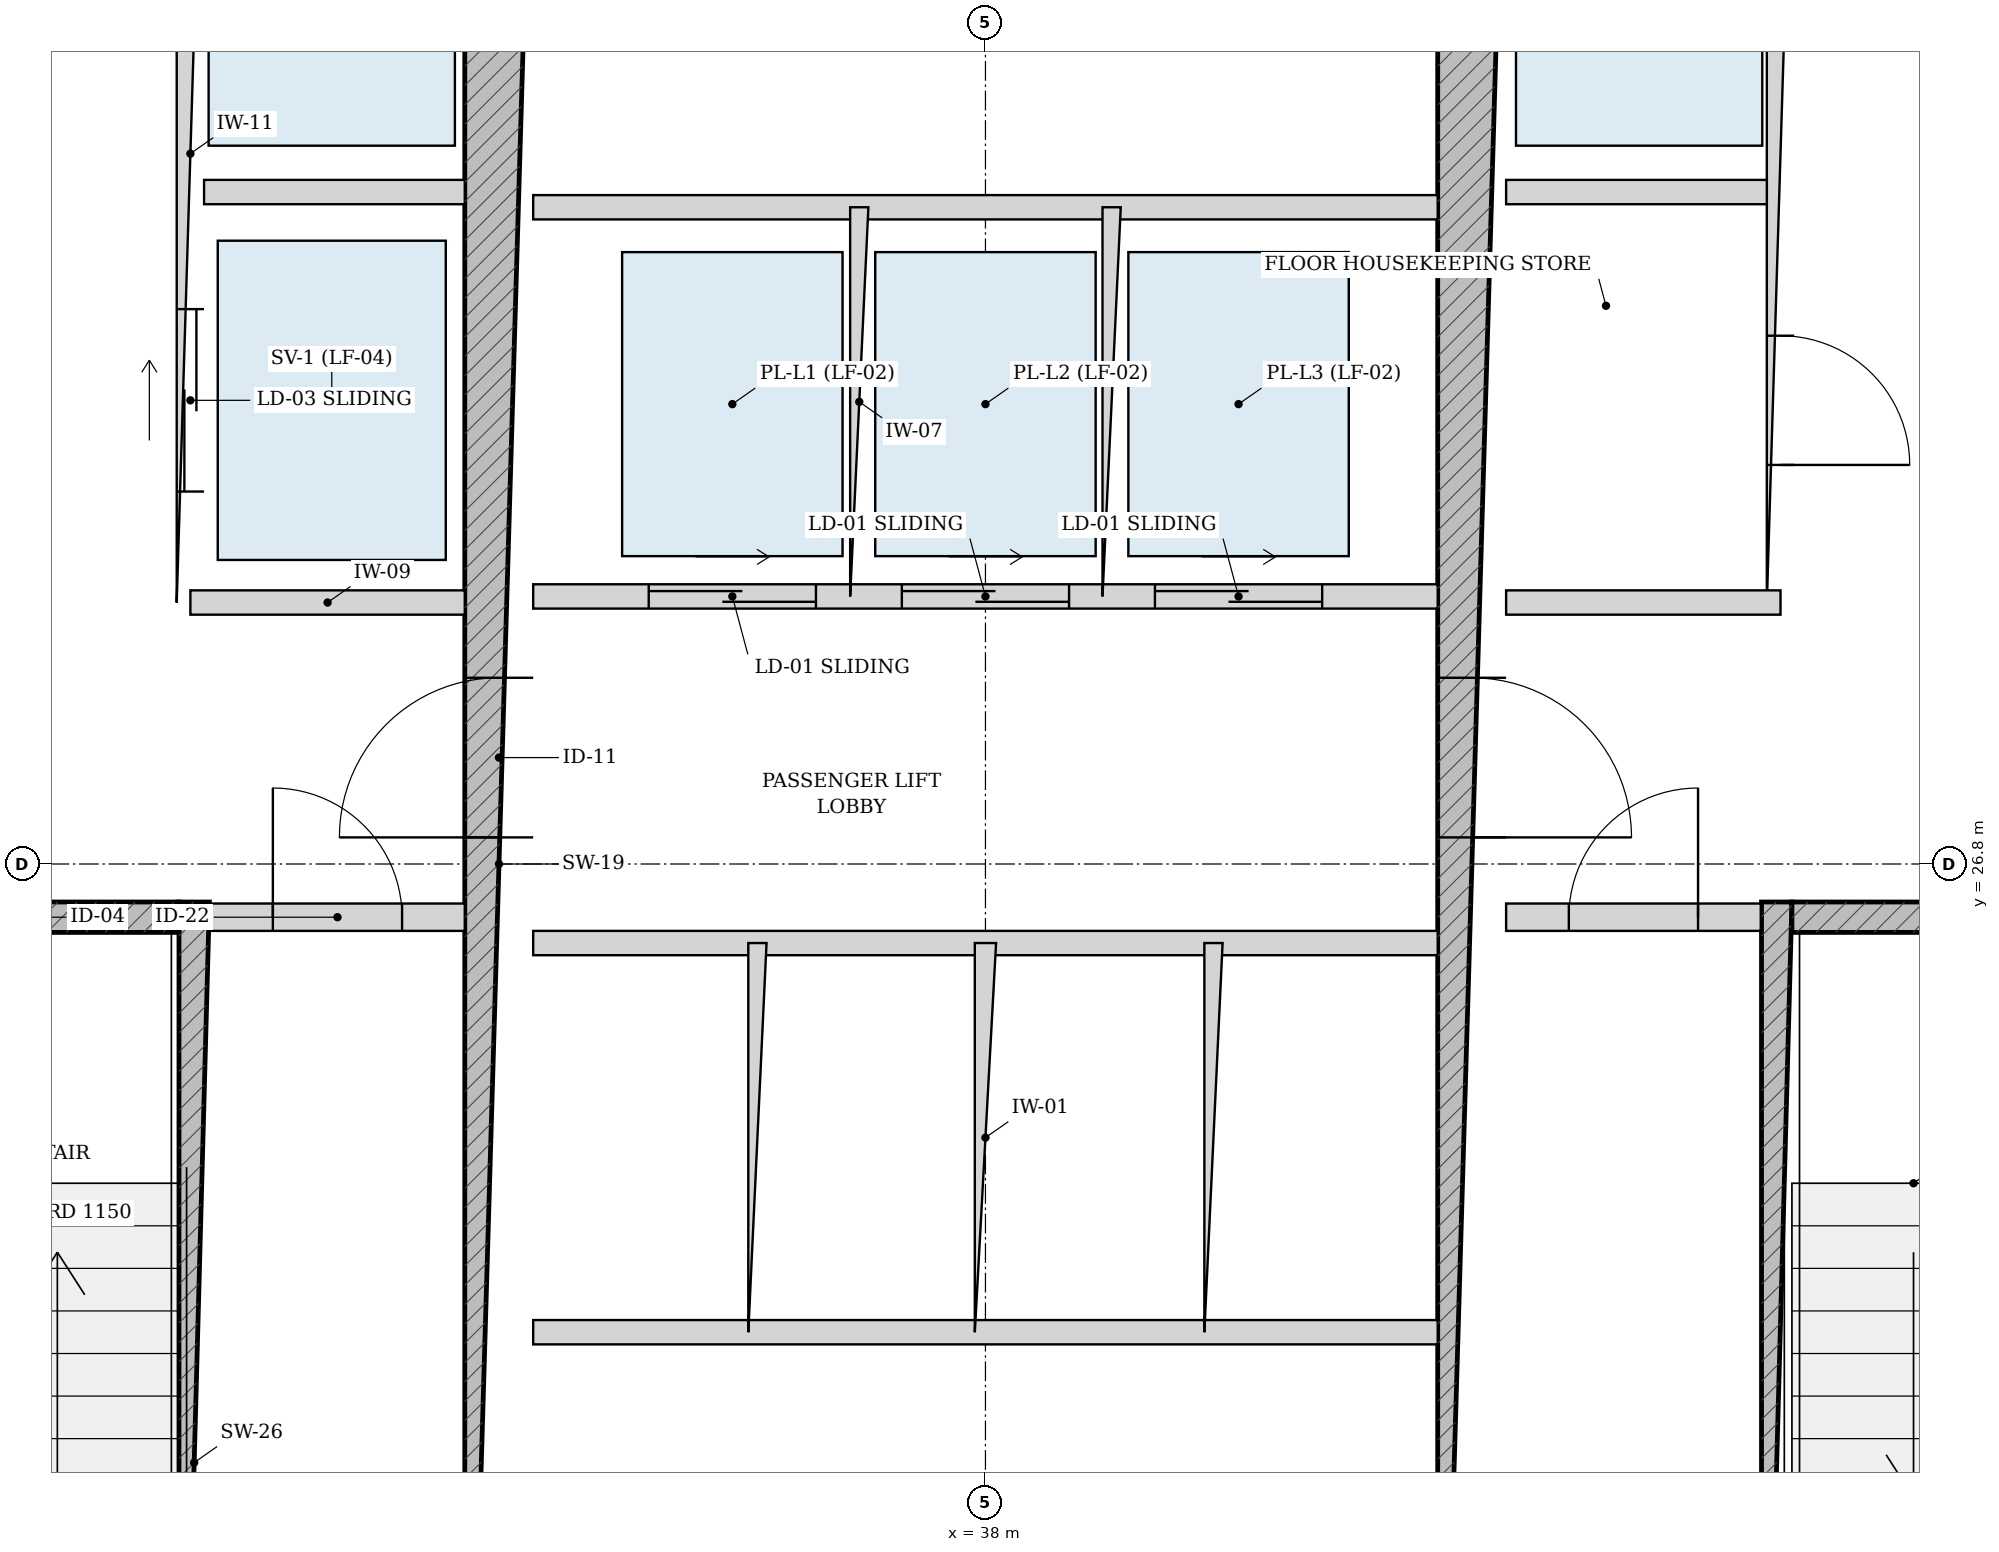
"""IFC4 building model, lengths in metres.
Left out: names, types, materials, properties, quantities, classifications, styles, units other than length and angle.
Written with IfcOpenShell. Run it as: python <this file> out.ifc"""

import sys

from ifc_helpers import new_model, si_unit, direction, frame, frame_2d, origin, place, context, subcontext, project, spatial, rectangle, extrude, source, transform, mapped, element, fill, save


model = new_model("IFC4")
c1 = context("Model", 3, precision=1e-05, world=origin(), true_north=direction((-0.2419218956, 0.970295726276)))
c2 = subcontext(c1, "Body", "Model", "MODEL_VIEW")
j1 = project(units=[si_unit("LENGTHUNIT", "METRE"), si_unit("PLANEANGLEUNIT", "RADIAN")], contexts=[c1])
p1 = place(None, origin())
s1 = spatial("IfcSite", under=j1, at=p1, CompositionType="ELEMENT")
p2 = place(p1, origin())
s2 = spatial("IfcBuilding", under=s1, at=p2, CompositionType="ELEMENT")
p3 = place(p2, frame((0.0, 0.0, 56.4)))
s3 = spatial("IfcBuildingStorey", under=s2, at=p3, CompositionType="ELEMENT", Elevation=56.4)
p4 = place(p3, frame((32.795, 19.175, 0.0), z_axis=(0.0, 0.0, 1.0), x_axis=(0.0, 1.0, 0.0)))
e1 = element("IfcWall", 1, at=p4, inside=s3, PredefinedType="SOLIDWALL", context=c2, shape_type="SweptSolid", body=[
    extrude(rectangle(XDim=7.375, YDim=0.2, at=frame_2d((3.688, 0.0))), origin(), (0.0, 0.0, 1.0), 3.32),
])
p5 = place(p3, frame((29.375, 26.45, 0.0), z_axis=(0.0, 0.0, 1.0), x_axis=(1.0, 0.0, 0.0)))
e2 = element("IfcWall", 2, at=p5, inside=s3, PredefinedType="SOLIDWALL", context=c2, shape_type="SweptSolid", body=[
    extrude(rectangle(XDim=3.32, YDim=0.2, at=frame_2d((1.66, 0.0))), origin(), (0.0, 0.0, 1.0), 3.32),
])
p6 = place(p5, frame((1.185, 0.0, 0.0)))
e3 = element("IfcOpeningElement", 3, at=p6, cuts=e2, PredefinedType="OPENING", context=c2, shape_type="SweptSolid", body=[
    extrude(rectangle(XDim=0.95, YDim=2.15, at=frame_2d((0.475, 1.075))), frame((0.0, 0.11, 0.0), z_axis=(0.0, -1.0, 0.0), x_axis=(1.0, 0.0, 0.0)), (0.0, 0.0, 1.0), 0.22),
])
p7 = place(p3, frame((43.205, 19.175, 0.0), z_axis=(0.0, 0.0, 1.0), x_axis=(0.0, 1.0, 0.0)))
e4 = element("IfcWall", 4, at=p7, inside=s3, PredefinedType="SOLIDWALL", context=c2, shape_type="SweptSolid", body=[
    extrude(rectangle(XDim=7.375, YDim=0.2, at=frame_2d((3.688, 0.0))), origin(), (0.0, 0.0, 1.0), 3.32),
])
p8 = place(p3, frame((43.305, 26.45, 0.0), z_axis=(0.0, 0.0, 1.0), x_axis=(1.0, 0.0, 0.0)))
e5 = element("IfcWall", 5, at=p8, inside=s3, PredefinedType="SOLIDWALL", context=c2, shape_type="SweptSolid", body=[
    extrude(rectangle(XDim=3.32, YDim=0.2, at=frame_2d((1.66, 0.0))), origin(), (0.0, 0.0, 1.0), 3.32),
])
p9 = place(p8, frame((1.185, 0.0, 0.0)))
e6 = element("IfcOpeningElement", 6, at=p9, cuts=e5, PredefinedType="OPENING", context=c2, shape_type="SweptSolid", body=[
    extrude(rectangle(XDim=0.95, YDim=2.15, at=frame_2d((0.475, 1.075))), frame((0.0, 0.11, 0.0), z_axis=(0.0, -1.0, 0.0), x_axis=(1.0, 0.0, 0.0)), (0.0, 0.0, 1.0), 0.22),
])
p10 = place(p3, frame((34.8, 19.175, 0.0), z_axis=(0.0, 0.0, 1.0), x_axis=(0.0, 1.0, 0.0)))
e7 = element("IfcWall", 7, at=p10, inside=s3, PredefinedType="SHEAR", context=c2, shape_type="SweptSolid", body=[
    extrude(rectangle(XDim=15.25, YDim=0.45, at=frame_2d((7.625, 0.0))), origin(), (0.0, 0.0, 1.0), 3.32),
])
p11 = place(p10, frame((7.8, 0.0, 0.0)))
e8 = element("IfcOpeningElement", 8, at=p11, cuts=e7, PredefinedType="OPENING", context=c2, shape_type="SweptSolid", body=[
    extrude(rectangle(XDim=1.05, YDim=2.15, at=frame_2d((0.525, 1.075))), frame((0.0, 0.235, 0.0), z_axis=(0.0, -1.0, 0.0), x_axis=(1.0, 0.0, 0.0)), (0.0, 0.0, 1.0), 0.47),
])
p12 = place(p3, frame((41.2, 19.175, 0.0), z_axis=(0.0, 0.0, 1.0), x_axis=(0.0, 1.0, 0.0)))
e9 = element("IfcWall", 9, at=p12, inside=s3, PredefinedType="SHEAR", context=c2, shape_type="SweptSolid", body=[
    extrude(rectangle(XDim=15.25, YDim=0.45, at=frame_2d((7.625, 0.0))), origin(), (0.0, 0.0, 1.0), 3.32),
])
p13 = place(p12, frame((7.8, 0.0, 0.0)))
e10 = element("IfcOpeningElement", 10, at=p13, cuts=e9, PredefinedType="OPENING", context=c2, shape_type="SweptSolid", body=[
    extrude(rectangle(XDim=1.05, YDim=2.15, at=frame_2d((0.525, 1.075))), frame((0.0, 0.235, 0.0), z_axis=(0.0, -1.0, 0.0), x_axis=(1.0, 0.0, 0.0)), (0.0, 0.0, 1.0), 0.47),
])
p14 = place(p3, frame((32.9, 26.45, 0.0), z_axis=(0.0, 0.0, 1.0), x_axis=(1.0, 0.0, 0.0)))
e11 = element("IfcWall", 11, at=p14, inside=s3, PredefinedType="PARTITIONING", context=c2, shape_type="SweptSolid", body=[
    extrude(rectangle(XDim=1.675, YDim=0.18, at=frame_2d((0.837, 0.0))), origin(), (0.0, 0.0, 1.0), 3.32),
])
p15 = place(p14, frame((0.413, 0.0, 0.0)))
e12 = element("IfcOpeningElement", 12, at=p15, cuts=e11, PredefinedType="OPENING", context=c2, shape_type="SweptSolid", body=[
    extrude(rectangle(XDim=0.85, YDim=2.1, at=frame_2d((0.425, 1.05))), frame((0.0, 0.1, 0.0), z_axis=(0.0, -1.0, 0.0), x_axis=(1.0, 0.0, 0.0)), (0.0, 0.0, 1.0), 0.2),
])
p16 = place(p3, frame((41.425, 26.45, 0.0), z_axis=(0.0, 0.0, 1.0), x_axis=(1.0, 0.0, 0.0)))
e13 = element("IfcWall", 13, at=p16, inside=s3, PredefinedType="PARTITIONING", context=c2, shape_type="SweptSolid", body=[
    extrude(rectangle(XDim=1.675, YDim=0.18, at=frame_2d((0.837, 0.0))), origin(), (0.0, 0.0, 1.0), 3.32),
])
p17 = place(p16, frame((0.413, 0.0, 0.0)))
e14 = element("IfcOpeningElement", 14, at=p17, cuts=e13, PredefinedType="OPENING", context=c2, shape_type="SweptSolid", body=[
    extrude(rectangle(XDim=0.85, YDim=2.1, at=frame_2d((0.425, 1.05))), frame((0.0, 0.1, 0.0), z_axis=(0.0, -1.0, 0.0), x_axis=(1.0, 0.0, 0.0)), (0.0, 0.0, 1.0), 0.2),
])
p18 = place(p3, frame((32.77, 28.52, 0.0), z_axis=(0.0, 0.0, 1.0), x_axis=(0.0, 1.0, 0.0)))
e15 = element("IfcWall", 15, at=p18, inside=s3, PredefinedType="PARTITIONING", context=c2, shape_type="SweptSolid", body=[
    extrude(rectangle(XDim=5.905, YDim=0.18, at=frame_2d((2.953, 0.0))), origin(), (0.0, 0.0, 1.0), 3.32),
])
p19 = place(p18, frame((3.655, 0.0, 0.0)))
e16 = element("IfcOpeningElement", 16, at=p19, cuts=e15, PredefinedType="OPENING", context=c2, shape_type="SweptSolid", body=[
    extrude(rectangle(XDim=1.15, YDim=2.2, at=frame_2d((0.575, 1.1))), frame((0.0, 0.1, 0.0), z_axis=(0.0, -1.0, 0.0), x_axis=(1.0, 0.0, 0.0)), (0.0, 0.0, 1.0), 0.2),
])
p20 = place(p18, frame((0.73, 0.0, 0.0)))
e17 = element("IfcOpeningElement", 17, at=p20, cuts=e15, PredefinedType="OPENING", context=c2, shape_type="SweptSolid", body=[
    extrude(rectangle(XDim=1.2, YDim=2.25, at=frame_2d((0.6, 1.125))), frame((0.0, 0.1, 0.0), z_axis=(0.0, -1.0, 0.0), x_axis=(1.0, 0.0, 0.0)), (0.0, 0.0, 1.0), 0.2),
])
p21 = place(p3, frame((32.86, 31.22, 0.0), z_axis=(0.0, 0.0, 1.0), x_axis=(1.0, 0.0, 0.0)))
e18 = element("IfcWall", 18, at=p21, inside=s3, PredefinedType="PARTITIONING", context=c2, shape_type="SweptSolid", body=[
    extrude(rectangle(XDim=1.715, YDim=0.16, at=frame_2d((0.857, 0.0))), origin(), (0.0, 0.0, 1.0), 3.32),
])
p22 = place(p3, frame((32.77, 28.52, 0.0), z_axis=(0.0, 0.0, 1.0), x_axis=(1.0, 0.0, 0.0)))
e19 = element("IfcWall", 19, at=p22, inside=s3, PredefinedType="PARTITIONING", context=c2, shape_type="SweptSolid", body=[
    extrude(rectangle(XDim=1.805, YDim=0.16, at=frame_2d((0.902, 0.0))), origin(), (0.0, 0.0, 1.0), 3.32),
])
p23 = place(p3, frame((43.23, 28.52, 0.0), z_axis=(0.0, 0.0, 1.0), x_axis=(0.0, 1.0, 0.0)))
e20 = element("IfcWall", 20, at=p23, inside=s3, PredefinedType="PARTITIONING", context=c2, shape_type="SweptSolid", body=[
    extrude(rectangle(XDim=5.905, YDim=0.18, at=frame_2d((2.953, 0.0))), origin(), (0.0, 0.0, 1.0), 3.32),
])
p24 = place(p23, frame((0.905, 0.0, 0.0)))
e21 = element("IfcOpeningElement", 21, at=p24, cuts=e20, PredefinedType="OPENING", context=c2, shape_type="SweptSolid", body=[
    extrude(rectangle(XDim=0.85, YDim=2.1, at=frame_2d((0.425, 1.05))), frame((0.0, 0.1, 0.0), z_axis=(0.0, -1.0, 0.0), x_axis=(1.0, 0.0, 0.0)), (0.0, 0.0, 1.0), 0.2),
])
p25 = place(p23, frame((3.655, 0.0, 0.0)))
e22 = element("IfcOpeningElement", 22, at=p25, cuts=e20, PredefinedType="OPENING", context=c2, shape_type="SweptSolid", body=[
    extrude(rectangle(XDim=1.15, YDim=2.2, at=frame_2d((0.575, 1.1))), frame((0.0, 0.1, 0.0), z_axis=(0.0, -1.0, 0.0), x_axis=(1.0, 0.0, 0.0)), (0.0, 0.0, 1.0), 0.2),
])
p26 = place(p3, frame((41.425, 31.22, 0.0), z_axis=(0.0, 0.0, 1.0), x_axis=(1.0, 0.0, 0.0)))
e23 = element("IfcWall", 23, at=p26, inside=s3, PredefinedType="PARTITIONING", context=c2, shape_type="SweptSolid", body=[
    extrude(rectangle(XDim=1.715, YDim=0.16, at=frame_2d((0.857, 0.0))), origin(), (0.0, 0.0, 1.0), 3.32),
])
p27 = place(p3, frame((41.425, 28.52, 0.0), z_axis=(0.0, 0.0, 1.0), x_axis=(1.0, 0.0, 0.0)))
e24 = element("IfcWall", 24, at=p27, inside=s3, PredefinedType="PARTITIONING", context=c2, shape_type="SweptSolid", body=[
    extrude(rectangle(XDim=1.805, YDim=0.16, at=frame_2d((0.902, 0.0))), origin(), (0.0, 0.0, 1.0), 3.32),
])
p28 = place(p3, frame((35.025, 28.56, 0.0), z_axis=(0.0, 0.0, 1.0), x_axis=(1.0, 0.0, 0.0)))
e25 = element("IfcWall", 25, at=p28, inside=s3, PredefinedType="PARTITIONING", context=c2, shape_type="SweptSolid", body=[
    extrude(rectangle(XDim=5.95, YDim=0.16, at=frame_2d((2.975, 0.0))), origin(), (0.0, 0.0, 1.0), 3.32),
])
p29 = place(p28, frame((0.76, 0.0, 0.0)))
e26 = element("IfcOpeningElement", 26, at=p29, cuts=e25, PredefinedType="OPENING", context=c2, shape_type="SweptSolid", body=[
    extrude(rectangle(XDim=1.1, YDim=2.2, at=frame_2d((0.55, 1.1))), frame((0.0, 0.09, 0.0), z_axis=(0.0, -1.0, 0.0), x_axis=(1.0, 0.0, 0.0)), (0.0, 0.0, 1.0), 0.18),
])
p30 = place(p28, frame((2.425, 0.0, 0.0)))
e27 = element("IfcOpeningElement", 27, at=p30, cuts=e25, PredefinedType="OPENING", context=c2, shape_type="SweptSolid", body=[
    extrude(rectangle(XDim=1.1, YDim=2.2, at=frame_2d((0.55, 1.1))), frame((0.0, 0.09, 0.0), z_axis=(0.0, -1.0, 0.0), x_axis=(1.0, 0.0, 0.0)), (0.0, 0.0, 1.0), 0.18),
])
p31 = place(p28, frame((4.09, 0.0, 0.0)))
e28 = element("IfcOpeningElement", 28, at=p31, cuts=e25, PredefinedType="OPENING", context=c2, shape_type="SweptSolid", body=[
    extrude(rectangle(XDim=1.1, YDim=2.2, at=frame_2d((0.55, 1.1))), frame((0.0, 0.09, 0.0), z_axis=(0.0, -1.0, 0.0), x_axis=(1.0, 0.0, 0.0)), (0.0, 0.0, 1.0), 0.18),
])
p32 = place(p3, frame((35.025, 31.12, 0.0), z_axis=(0.0, 0.0, 1.0), x_axis=(1.0, 0.0, 0.0)))
e29 = element("IfcWall", 29, at=p32, inside=s3, PredefinedType="PARTITIONING", context=c2, shape_type="SweptSolid", body=[
    extrude(rectangle(XDim=5.95, YDim=0.16, at=frame_2d((2.975, 0.0))), origin(), (0.0, 0.0, 1.0), 3.32),
])
for number, where, z_axis, x_axis in (
    (30, (37.17, 28.56, 0.0), (0.0, 0.0, 1.0), (0.0, 1.0, 0.0)),
    (31, (38.83, 28.56, 0.0), (0.0, 0.0, 1.0), (0.0, 1.0, 0.0)),
):
    element("IfcWall", number, at=place(p3, frame(where, z_axis=z_axis, x_axis=x_axis)), inside=s3, PredefinedType="PARTITIONING", context=c2, shape_type="SweptSolid", body=[
        extrude(rectangle(XDim=2.56, YDim=0.12, at=frame_2d((1.28, 0.0))), origin(), (0.0, 0.0, 1.0), 3.32),
    ])
for number, where, z_axis, x_axis in (
    (32, (35.025, 26.28, 0.0), (0.0, 0.0, 1.0), (1.0, 0.0, 0.0)),
    (33, (35.025, 23.72, 0.0), (0.0, 0.0, 1.0), (1.0, 0.0, 0.0)),
):
    element("IfcWall", number, at=place(p3, frame(where, z_axis=z_axis, x_axis=x_axis)), inside=s3, PredefinedType="PARTITIONING", context=c2, shape_type="SweptSolid", body=[
        extrude(rectangle(XDim=5.95, YDim=0.16, at=frame_2d((2.975, 0.0))), origin(), (0.0, 0.0, 1.0), 3.32),
    ])
p33 = place(p3, frame((36.5, 23.72, 0.0), z_axis=(0.0, 0.0, 1.0), x_axis=(0.0, 1.0, 0.0)))
e34 = element("IfcWall", 34, at=p33, inside=s3, PredefinedType="PARTITIONING", context=c2, shape_type="SweptSolid", body=[
    extrude(rectangle(XDim=2.56, YDim=0.12, at=frame_2d((1.28, 0.0))), origin(), (0.0, 0.0, 1.0), 3.32),
])
p34 = place(p3, frame((38.0, 23.72, 0.0), z_axis=(0.0, 0.0, 1.0), x_axis=(0.0, 1.0, 0.0)))
e35 = element("IfcWall", 35, at=p34, inside=s3, PredefinedType="PARTITIONING", context=c2, shape_type="SweptSolid", body=[
    extrude(rectangle(XDim=2.56, YDim=0.14, at=frame_2d((1.28, 0.0))), origin(), (0.0, 0.0, 1.0), 3.32),
])
p35 = place(p3, frame((39.5, 23.72, 0.0), z_axis=(0.0, 0.0, 1.0), x_axis=(0.0, 1.0, 0.0)))
e36 = element("IfcWall", 36, at=p35, inside=s3, PredefinedType="PARTITIONING", context=c2, shape_type="SweptSolid", body=[
    extrude(rectangle(XDim=2.56, YDim=0.12, at=frame_2d((1.28, 0.0))), origin(), (0.0, 0.0, 1.0), 3.32),
])
m1 = source(origin(), c2, "Body", "SweptSolid", [
    extrude(rectangle(XDim=1.05, YDim=2.15, at=frame_2d((0.525, 1.075))), frame((0.0, 0.025, 0.0), z_axis=(0.0, -1.0, 0.0), x_axis=(1.0, 0.0, 0.0)), (0.0, 0.0, 1.0), 0.05),
])
p36 = place(p11, origin())
e37 = element("IfcDoor", 37, at=p36, inside=s3, OperationType="SINGLE_SWING_LEFT", PredefinedType="DOOR", context=c2, shape_type="MappedRepresentation", body=[
    mapped(m1, transform((0.0, 0.0, 0.0), scale=1.0)),
])
fill(e8, e37)
p37 = place(p13, frame((1.05, 0.0, 0.0), z_axis=(0.0, 0.0, 1.0), x_axis=(-1.0, 0.0, 0.0)))
e38 = element("IfcDoor", 38, at=p37, inside=s3, OperationType="SINGLE_SWING_RIGHT", PredefinedType="DOOR", context=c2, shape_type="MappedRepresentation", body=[
    mapped(m1, transform((0.0, 0.0, 0.0), scale=1.0)),
])
fill(e10, e38)
m2 = source(origin(), c2, "Body", "SweptSolid", [
    extrude(rectangle(XDim=0.85, YDim=2.1, at=frame_2d((0.425, 1.05))), frame((0.0, 0.025, 0.0), z_axis=(0.0, -1.0, 0.0), x_axis=(1.0, 0.0, 0.0)), (0.0, 0.0, 1.0), 0.05),
])
p38 = place(p15, origin())
e39 = element("IfcDoor", 39, at=p38, inside=s3, OperationType="SINGLE_SWING_LEFT", PredefinedType="DOOR", context=c2, shape_type="MappedRepresentation", body=[
    mapped(m2, transform((0.0, 0.0, 0.0), scale=1.0)),
])
fill(e12, e39)
p39 = place(p17, origin())
e40 = element("IfcDoor", 40, at=p39, inside=s3, OperationType="SINGLE_SWING_RIGHT", PredefinedType="DOOR", context=c2, shape_type="MappedRepresentation", body=[
    mapped(m2, transform((0.0, 0.0, 0.0), scale=1.0)),
])
fill(e14, e40)
p40 = place(p24, frame((0.85, 0.0, 0.0), z_axis=(0.0, 0.0, 1.0), x_axis=(-1.0, 0.0, 0.0)))
e41 = element("IfcDoor", 41, at=p40, inside=s3, OperationType="SINGLE_SWING_RIGHT", PredefinedType="DOOR", context=c2, shape_type="MappedRepresentation", body=[
    mapped(m2, transform((0.0, 0.0, 0.0), scale=1.0)),
])
fill(e21, e41)
m3 = source(origin(), c2, "Body", "SweptSolid", [
    extrude(rectangle(XDim=1.2, YDim=2.25, at=frame_2d((0.6, 1.125))), frame((0.0, 0.025, 0.0), z_axis=(0.0, -1.0, 0.0), x_axis=(1.0, 0.0, 0.0)), (0.0, 0.0, 1.0), 0.05),
])
p41 = place(p20, origin())
e42 = element("IfcDoor", 42, at=p41, inside=s3, OperationType="DOUBLE_DOOR_SLIDING", PredefinedType="DOOR", context=c2, shape_type="MappedRepresentation", body=[
    mapped(m3, transform((0.0, 0.0, 0.0), scale=1.0)),
])
fill(e17, e42)
m4 = source(origin(), c2, "Body", "SweptSolid", [
    extrude(rectangle(XDim=1.1, YDim=2.2, at=frame_2d((0.55, 1.1))), frame((0.0, 0.025, 0.0), z_axis=(0.0, -1.0, 0.0), x_axis=(1.0, 0.0, 0.0)), (0.0, 0.0, 1.0), 0.05),
])
p42 = place(p29, origin())
e43 = element("IfcDoor", 43, at=p42, inside=s3, OperationType="DOUBLE_DOOR_SLIDING", PredefinedType="DOOR", context=c2, shape_type="MappedRepresentation", body=[
    mapped(m4, transform((0.0, 0.0, 0.0), scale=1.0)),
])
fill(e26, e43)
p43 = place(p30, origin())
e44 = element("IfcDoor", 44, at=p43, inside=s3, OperationType="DOUBLE_DOOR_SLIDING", PredefinedType="DOOR", context=c2, shape_type="MappedRepresentation", body=[
    mapped(m4, transform((0.0, 0.0, 0.0), scale=1.0)),
])
fill(e27, e44)
p44 = place(p31, origin())
e45 = element("IfcDoor", 45, at=p44, inside=s3, OperationType="DOUBLE_DOOR_SLIDING", PredefinedType="DOOR", context=c2, shape_type="MappedRepresentation", body=[
    mapped(m4, transform((0.0, 0.0, 0.0), scale=1.0)),
])
fill(e28, e45)
save(model, sys.argv[1])
